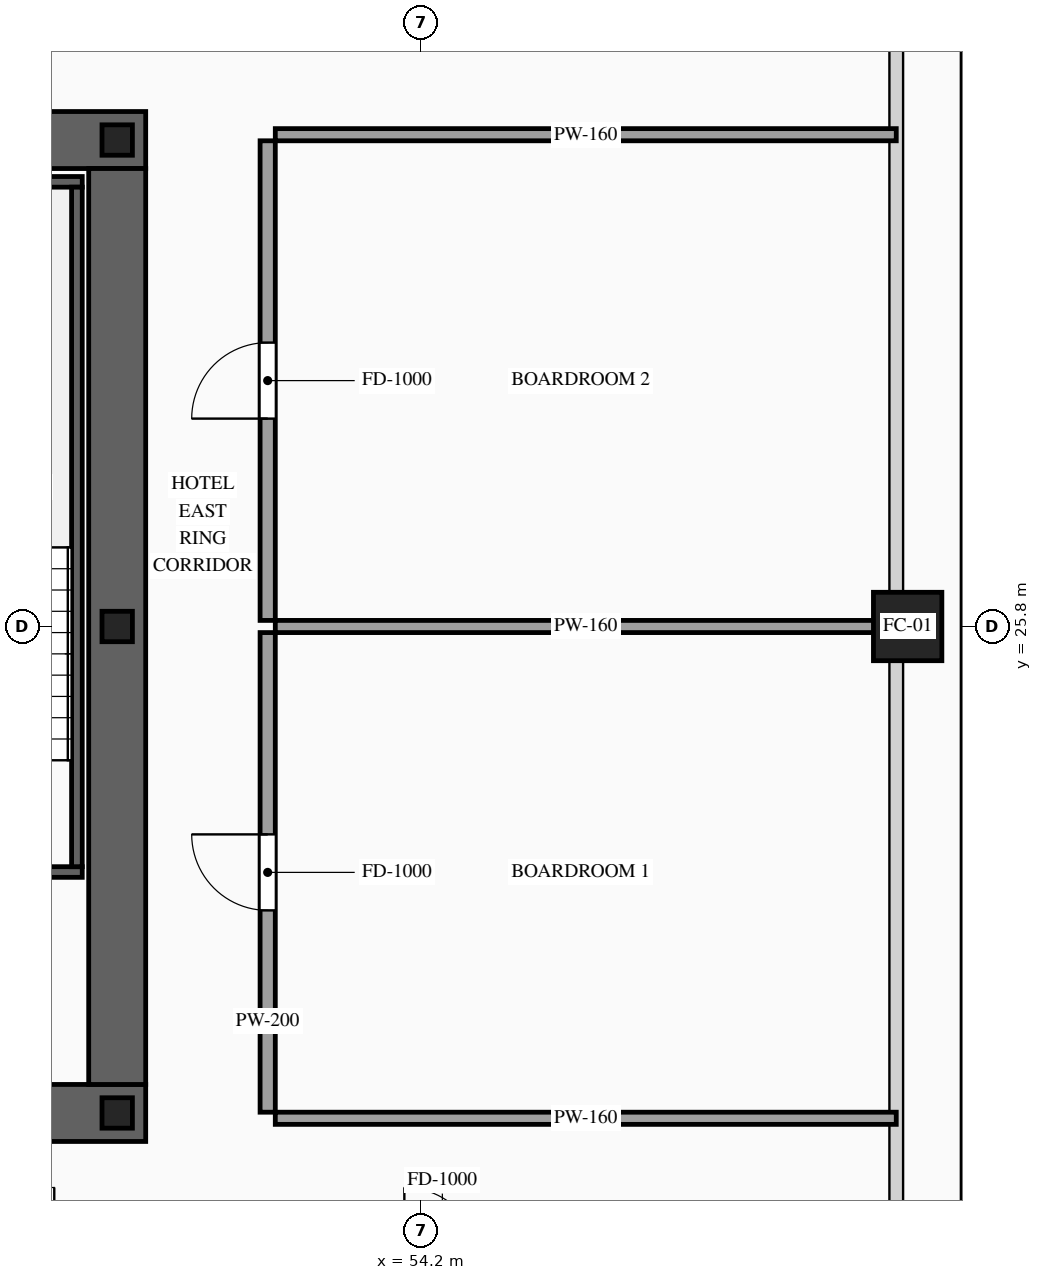
"""IFC4 building model, lengths in metres.
Left out: names, types, materials, properties, quantities, classifications, styles, units other than length and angle.
Written with IfcOpenShell. Run it as: python <this file> out.ifc"""

import sys

from ifc_helpers import new_model, si_unit, direction, frame, frame_2d, origin, origin_2d, place, context, subcontext, project, spatial, rectangle, hollow_rectangle, i_section, extrude, source, transform, mapped, element, fill, save


model = new_model("IFC4")
c1 = context("Model", 3, precision=1e-05, world=origin(), true_north=direction((0.0, 1.0)))
c2 = subcontext(c1, "Body", "Model", "MODEL_VIEW")
j1 = project(units=[si_unit("LENGTHUNIT", "METRE"), si_unit("PLANEANGLEUNIT", "RADIAN")], contexts=[c1])
p1 = place(None, origin())
s1 = spatial("IfcSite", under=j1, at=p1, CompositionType="ELEMENT")
p2 = place(p1, origin())
s2 = spatial("IfcBuilding", under=s1, at=p2, CompositionType="ELEMENT")
p3 = place(p2, frame((0.0, 0.0, 156.0)))
s3 = spatial("IfcBuildingStorey", under=s2, at=p3, CompositionType="ELEMENT", Elevation=156.0)
p4 = place(p3, frame((23.425, 19.4, 0.0), z_axis=(0.0, 0.0, 1.0), x_axis=(1.0, 0.0, 0.0)))
e1 = element("IfcWall", 1, at=p4, inside=s3, PredefinedType="SHEAR", context=c2, shape_type="SweptSolid", body=[
    extrude(rectangle(XDim=27.15, YDim=0.75, at=frame_2d((13.575, 0.0))), origin(), (0.0, 0.0, 1.0), 3.6),
])
p5 = place(p4, frame((2.025, 0.0, 0.0)))
e2 = element("IfcOpeningElement", 2, at=p5, cuts=e1, PredefinedType="OPENING", context=c2, shape_type="SweptSolid", body=[
    extrude(rectangle(XDim=1.1, YDim=2.2, at=frame_2d((0.55, 1.1))), frame((0.0, 0.39, 0.0), z_axis=(0.0, -1.0, 0.0), x_axis=(1.0, 0.0, 0.0)), (0.0, 0.0, 1.0), 0.78),
])
p6 = place(p4, frame((9.925, 0.0, 0.0)))
e3 = element("IfcOpeningElement", 3, at=p6, cuts=e1, PredefinedType="OPENING", context=c2, shape_type="SweptSolid", body=[
    extrude(rectangle(XDim=1.1, YDim=2.2, at=frame_2d((0.55, 1.1))), frame((0.0, 0.39, 0.0), z_axis=(0.0, -1.0, 0.0), x_axis=(1.0, 0.0, 0.0)), (0.0, 0.0, 1.0), 0.78),
])
p7 = place(p4, frame((23.125, 0.0, 0.0)))
e4 = element("IfcOpeningElement", 4, at=p7, cuts=e1, PredefinedType="OPENING", context=c2, shape_type="SweptSolid", body=[
    extrude(rectangle(XDim=1.1, YDim=2.2, at=frame_2d((0.55, 1.1))), frame((0.0, 0.39, 0.0), z_axis=(0.0, -1.0, 0.0), x_axis=(1.0, 0.0, 0.0)), (0.0, 0.0, 1.0), 0.78),
])
p8 = place(p4, frame((19.745, 0.0, 0.0)))
e5 = element("IfcOpeningElement", 5, at=p8, cuts=e1, PredefinedType="OPENING", context=c2, shape_type="SweptSolid", body=[
    extrude(rectangle(XDim=0.9, YDim=2.15, at=frame_2d((0.45, 1.075))), frame((0.0, 0.39, 0.0), z_axis=(0.0, -1.0, 0.0), x_axis=(1.0, 0.0, 0.0)), (0.0, 0.0, 1.0), 0.78),
])
p9 = place(p4, frame((18.305, 0.0, 0.0)))
e6 = element("IfcOpeningElement", 6, at=p9, cuts=e1, PredefinedType="OPENING", context=c2, shape_type="SweptSolid", body=[
    extrude(rectangle(XDim=0.9, YDim=2.15, at=frame_2d((0.45, 1.075))), frame((0.0, 0.39, 0.0), z_axis=(0.0, -1.0, 0.0), x_axis=(1.0, 0.0, 0.0)), (0.0, 0.0, 1.0), 0.78),
])
p10 = place(p3, frame((23.425, 32.2, 0.0), z_axis=(0.0, 0.0, 1.0), x_axis=(1.0, 0.0, 0.0)))
e7 = element("IfcWall", 7, at=p10, inside=s3, PredefinedType="SHEAR", context=c2, shape_type="SweptSolid", body=[
    extrude(rectangle(XDim=27.15, YDim=0.75, at=frame_2d((13.575, 0.0))), origin(), (0.0, 0.0, 1.0), 3.6),
])
p11 = place(p10, frame((4.645, 0.0, 0.0)))
e8 = element("IfcOpeningElement", 8, at=p11, cuts=e7, PredefinedType="OPENING", context=c2, shape_type="SweptSolid", body=[
    extrude(rectangle(XDim=0.9, YDim=2.15, at=frame_2d((0.45, 1.075))), frame((0.0, 0.39, 0.0), z_axis=(0.0, -1.0, 0.0), x_axis=(1.0, 0.0, 0.0)), (0.0, 0.0, 1.0), 0.78),
])
p12 = place(p10, frame((9.925, 0.0, 0.0)))
e9 = element("IfcOpeningElement", 9, at=p12, cuts=e7, PredefinedType="OPENING", context=c2, shape_type="SweptSolid", body=[
    extrude(rectangle(XDim=1.1, YDim=2.2, at=frame_2d((0.55, 1.1))), frame((0.0, 0.39, 0.0), z_axis=(0.0, -1.0, 0.0), x_axis=(1.0, 0.0, 0.0)), (0.0, 0.0, 1.0), 0.78),
])
p13 = place(p10, frame((15.775, 0.0, 0.0)))
e10 = element("IfcOpeningElement", 10, at=p13, cuts=e7, PredefinedType="OPENING", context=c2, shape_type="SweptSolid", body=[
    extrude(rectangle(XDim=1.1, YDim=2.2, at=frame_2d((0.55, 1.1))), frame((0.0, 0.39, 0.0), z_axis=(0.0, -1.0, 0.0), x_axis=(1.0, 0.0, 0.0)), (0.0, 0.0, 1.0), 0.78),
])
p14 = place(p10, frame((18.305, 0.0, 0.0)))
e11 = element("IfcOpeningElement", 11, at=p14, cuts=e7, PredefinedType="OPENING", context=c2, shape_type="SweptSolid", body=[
    extrude(rectangle(XDim=0.9, YDim=2.15, at=frame_2d((0.45, 1.075))), frame((0.0, 0.39, 0.0), z_axis=(0.0, -1.0, 0.0), x_axis=(1.0, 0.0, 0.0)), (0.0, 0.0, 1.0), 0.78),
])
p15 = place(p10, frame((19.745, 0.0, 0.0)))
e12 = element("IfcOpeningElement", 12, at=p15, cuts=e7, PredefinedType="OPENING", context=c2, shape_type="SweptSolid", body=[
    extrude(rectangle(XDim=0.9, YDim=2.15, at=frame_2d((0.45, 1.075))), frame((0.0, 0.39, 0.0), z_axis=(0.0, -1.0, 0.0), x_axis=(1.0, 0.0, 0.0)), (0.0, 0.0, 1.0), 0.78),
])
m1 = source(origin(), c2, "Body", "SweptSolid", [
    extrude(rectangle(XDim=12.05, YDim=0.75, at=frame_2d((6.025, 0.0))), origin(), (0.0, 0.0, 1.0), 3.6),
])
p16 = place(p3, frame((50.2, 19.775, 0.0), z_axis=(0.0, 0.0, 1.0), x_axis=(0.0, 1.0, 0.0)))
e13 = element("IfcWall", 13, at=p16, inside=s3, PredefinedType="SHEAR", context=c2, shape_type="MappedRepresentation", body=[
    mapped(m1, transform((0.0, 0.0, 0.0), scale=1.0)),
])
m2 = source(origin(), c2, "Body", "SweptSolid", [
    extrude(i_section(OverallWidth=0.4, OverallDepth=0.4, WebThickness=0.013, FlangeThickness=0.021, at=origin_2d()), origin(), (0.0, 0.0, 1.0), 3.6),
])
for number, where, z_axis, x_axis in (
    (14, (50.2, 19.4, 0.0), (0.0, 0.0, 1.0), (1.0, 0.0, 0.0)),
    (15, (50.2, 25.8, 0.0), (0.0, 0.0, 1.0), (1.0, 0.0, 0.0)),
    (16, (50.2, 32.2, 0.0), (0.0, 0.0, 1.0), (1.0, 0.0, 0.0)),
):
    element("IfcColumn", number, at=place(p3, frame(where, z_axis=z_axis, x_axis=x_axis)), inside=s3, PredefinedType="COLUMN", context=c2, shape_type="MappedRepresentation", body=[
        mapped(m2, transform((0.0, 0.0, 0.0), scale=1.0)),
    ])
m3 = source(origin(), c2, "Body", "SweptSolid", [
    extrude(hollow_rectangle(XDim=0.9, YDim=0.9, WallThickness=0.042, at=origin_2d()), origin(), (0.0, 0.0, 1.0), 3.6),
])
p17 = place(p3, frame((60.6, 25.8, 0.0), z_axis=(0.0, 0.0, 1.0), x_axis=(1.0, 0.0, 0.0)))
e17 = element("IfcColumn", 17, at=p17, inside=s3, PredefinedType="COLUMN", context=c2, shape_type="MappedRepresentation", body=[
    mapped(m3, transform((0.0, 0.0, 0.0), scale=1.0)),
])
p18 = place(p3, frame((46.46, 22.57, 0.0), z_axis=(0.0, 0.0, 1.0), x_axis=(1.0, 0.0, 0.0)))
e18 = element("IfcWall", 18, at=p18, inside=s3, PredefinedType="SOLIDWALL", context=c2, shape_type="SweptSolid", body=[
    extrude(rectangle(XDim=3.28, YDim=0.14, at=frame_2d((1.64, 0.0))), origin(), (0.0, 0.0, 1.0), 3.38),
])
p19 = place(p18, frame((1.09, 0.0, 0.0)))
e19 = element("IfcOpeningElement", 19, at=p19, cuts=e18, PredefinedType="OPENING", context=c2, shape_type="SweptSolid", body=[
    extrude(rectangle(XDim=1.1, YDim=2.2, at=frame_2d((0.55, 1.1))), frame((0.0, 0.085, 0.0), z_axis=(0.0, -1.0, 0.0), x_axis=(1.0, 0.0, 0.0)), (0.0, 0.0, 1.0), 0.17),
])
m4 = source(origin(), c2, "Body", "SweptSolid", [
    extrude(rectangle(XDim=3.28, YDim=0.14, at=frame_2d((1.64, 0.0))), origin(), (0.0, 0.0, 1.0), 3.38),
])
p20 = place(p3, frame((46.46, 31.65, 0.0), z_axis=(0.0, 0.0, 1.0), x_axis=(1.0, 0.0, 0.0)))
e20 = element("IfcWall", 20, at=p20, inside=s3, PredefinedType="SOLIDWALL", context=c2, shape_type="MappedRepresentation", body=[
    mapped(m4, transform((0.0, 0.0, 0.0), scale=1.0)),
])
m5 = source(origin(), c2, "Body", "SweptSolid", [
    extrude(rectangle(XDim=8.94, YDim=0.14, at=frame_2d((4.47, 0.0))), origin(), (0.0, 0.0, 1.0), 3.38),
])
p21 = place(p3, frame((49.67, 22.64, 0.0), z_axis=(0.0, 0.0, 1.0), x_axis=(0.0, 1.0, 0.0)))
e21 = element("IfcWall", 21, at=p21, inside=s3, PredefinedType="SOLIDWALL", context=c2, shape_type="MappedRepresentation", body=[
    mapped(m5, transform((0.0, 0.0, 0.0), scale=1.0)),
])
p22 = place(p3, frame((52.18, 19.41, 0.0), z_axis=(0.0, 0.0, 1.0), x_axis=(0.0, 1.0, 0.0)))
e22 = element("IfcWall", 22, at=p22, inside=s3, PredefinedType="PARTITIONING", context=c2, shape_type="SweptSolid", body=[
    extrude(rectangle(XDim=6.31, YDim=0.2, at=frame_2d((3.155, 0.0))), origin(), (0.0, 0.0, 1.0), 3.38),
])
p23 = place(p22, frame((2.655, 0.0, 0.0)))
e23 = element("IfcOpeningElement", 23, at=p23, cuts=e22, PredefinedType="OPENING", context=c2, shape_type="SweptSolid", body=[
    extrude(rectangle(XDim=1.0, YDim=2.2, at=frame_2d((0.5, 1.1))), frame((0.0, 0.115, 0.0), z_axis=(0.0, -1.0, 0.0), x_axis=(1.0, 0.0, 0.0)), (0.0, 0.0, 1.0), 0.23),
])
m6 = source(origin(), c2, "Body", "SweptSolid", [
    extrude(rectangle(XDim=8.17, YDim=0.16, at=frame_2d((4.085, 0.0))), origin(), (0.0, 0.0, 1.0), 2.675),
])
p24 = place(p3, frame((52.28, 25.8, 0.0), z_axis=(0.0, 0.0, 1.0), x_axis=(1.0, 0.0, 0.0)))
e24 = element("IfcWall", 24, at=p24, inside=s3, PredefinedType="PARTITIONING", context=c2, shape_type="MappedRepresentation", body=[
    mapped(m6, transform((0.0, 0.0, 0.0), scale=1.0)),
])
m7 = source(origin(), c2, "Body", "SweptSolid", [
    extrude(rectangle(XDim=8.17, YDim=0.16, at=frame_2d((4.085, 0.0))), origin(), (0.0, 0.0, 1.0), 2.875),
])
p25 = place(p3, frame((52.28, 19.33, 0.0), z_axis=(0.0, 0.0, 1.0), x_axis=(1.0, 0.0, 0.0)))
e25 = element("IfcWall", 25, at=p25, inside=s3, PredefinedType="PARTITIONING", context=c2, shape_type="MappedRepresentation", body=[
    mapped(m7, transform((0.0, 0.0, 0.0), scale=1.0)),
])
p26 = place(p3, frame((52.18, 25.88, 0.0), z_axis=(0.0, 0.0, 1.0), x_axis=(0.0, 1.0, 0.0)))
e26 = element("IfcWall", 26, at=p26, inside=s3, PredefinedType="PARTITIONING", context=c2, shape_type="SweptSolid", body=[
    extrude(rectangle(XDim=6.31, YDim=0.2, at=frame_2d((3.155, 0.0))), origin(), (0.0, 0.0, 1.0), 3.38),
])
p27 = place(p26, frame((2.655, 0.0, 0.0)))
e27 = element("IfcOpeningElement", 27, at=p27, cuts=e26, PredefinedType="OPENING", context=c2, shape_type="SweptSolid", body=[
    extrude(rectangle(XDim=1.0, YDim=2.2, at=frame_2d((0.5, 1.1))), frame((0.0, 0.115, 0.0), z_axis=(0.0, -1.0, 0.0), x_axis=(1.0, 0.0, 0.0)), (0.0, 0.0, 1.0), 0.23),
])
p28 = place(p3, frame((52.28, 32.27, 0.0), z_axis=(0.0, 0.0, 1.0), x_axis=(1.0, 0.0, 0.0)))
e28 = element("IfcWall", 28, at=p28, inside=s3, PredefinedType="PARTITIONING", context=c2, shape_type="MappedRepresentation", body=[
    mapped(m7, transform((0.0, 0.0, 0.0), scale=1.0)),
])
m8 = source(origin(), c2, "Body", "SweptSolid", [
    extrude(rectangle(XDim=1.0, YDim=2.2, at=frame_2d((0.5, 1.1))), frame((0.0, 0.025, 0.0), z_axis=(0.0, -1.0, 0.0), x_axis=(1.0, 0.0, 0.0)), (0.0, 0.0, 1.0), 0.05),
])
p29 = place(p23, origin())
e29 = element("IfcDoor", 29, at=p29, inside=s3, OperationType="SINGLE_SWING_RIGHT", PredefinedType="DOOR", context=c2, shape_type="MappedRepresentation", body=[
    mapped(m8, transform((0.0, 0.0, 0.0), scale=1.0)),
])
fill(e23, e29)
p30 = place(p27, origin())
e30 = element("IfcDoor", 30, at=p30, inside=s3, OperationType="SINGLE_SWING_LEFT", PredefinedType="DOOR", context=c2, shape_type="MappedRepresentation", body=[
    mapped(m8, transform((0.0, 0.0, 0.0), scale=1.0)),
])
fill(e27, e30)
save(model, sys.argv[1])
